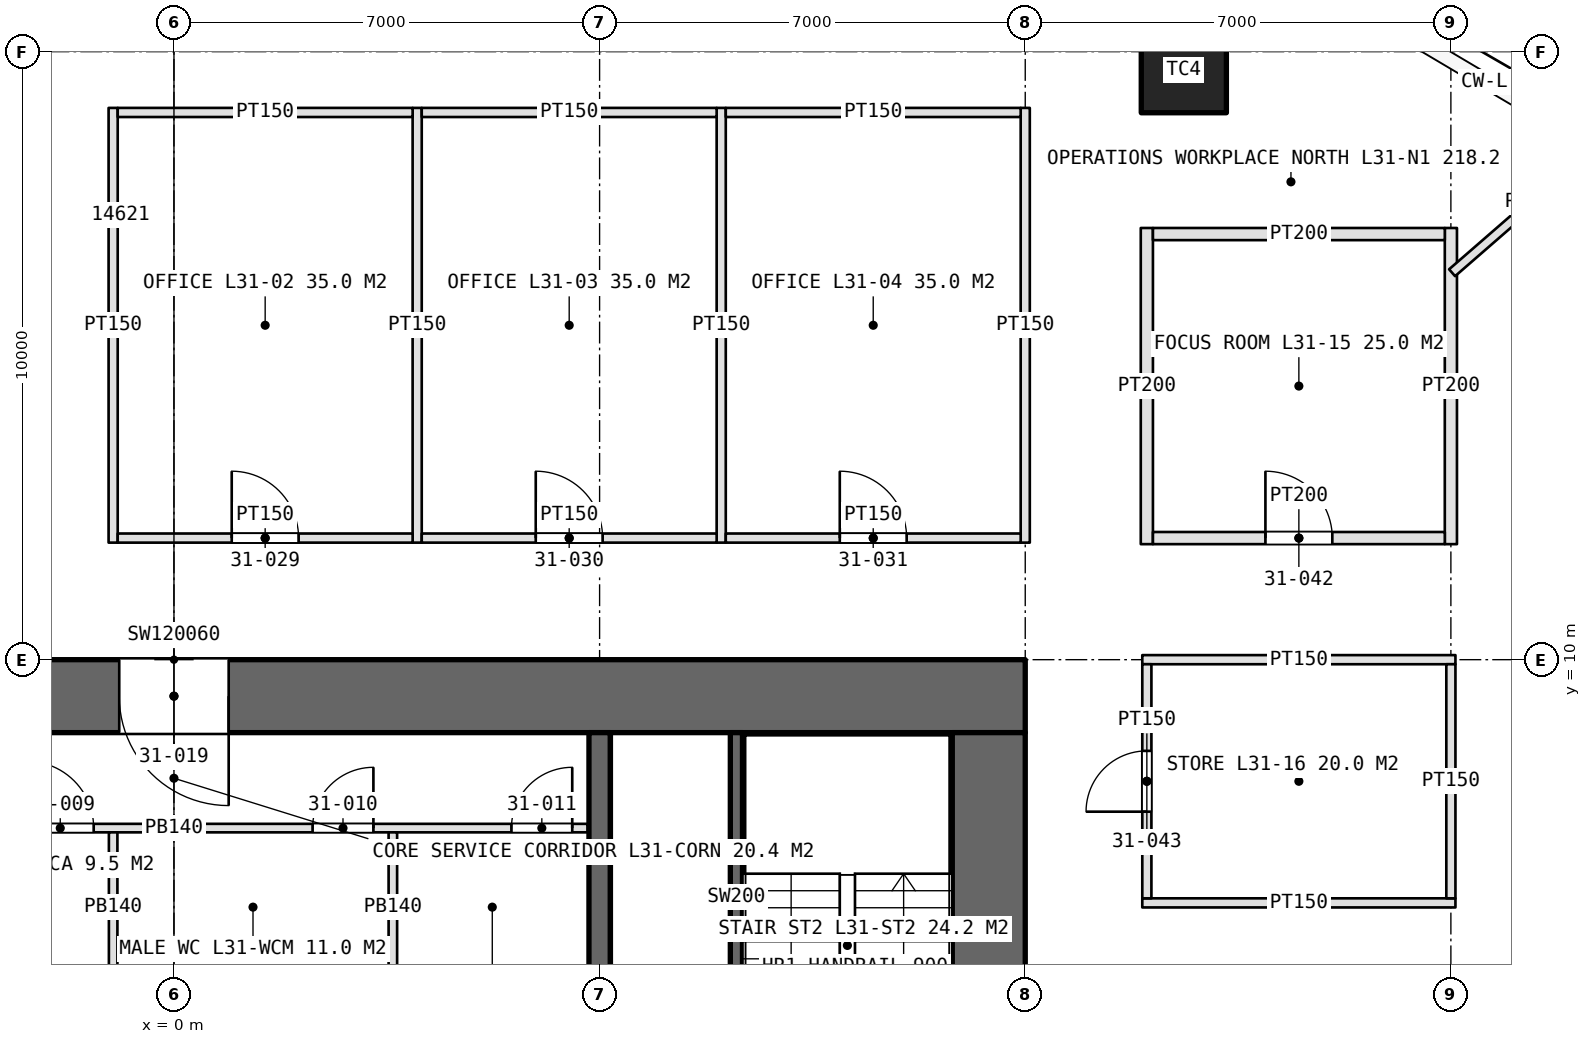
"""IFC4 building model, lengths in metres.
Left out: names, types, materials, properties, quantities, classifications, styles, units other than length and angle.
Written with IfcOpenShell. Run it as: python <this file> out.ifc"""

import sys

from ifc_helpers import new_model, si_unit, direction, frame, frame_2d, origin, origin_2d, place, context, subcontext, project, spatial, rectangle, extrude, element, fill, save


model = new_model("IFC4")
c1 = context("Model", 3, precision=1e-05, world=origin(), true_north=direction((0.0, 1.0)))
c2 = subcontext(c1, "Body", "Model", "MODEL_VIEW")
j1 = project(units=[si_unit("LENGTHUNIT", "METRE"), si_unit("PLANEANGLEUNIT", "RADIAN")], contexts=[c1])
p1 = place(None, origin())
s1 = spatial("IfcSite", under=j1, at=p1, CompositionType="ELEMENT")
p2 = place(p1, origin())
s2 = spatial("IfcBuilding", under=s1, at=p2, CompositionType="ELEMENT")
p3 = place(p2, frame((0.0, 0.0, 147.0)))
s3 = spatial("IfcBuildingStorey", under=s2, at=p3, CompositionType="ELEMENT", Elevation=147.0)
p4 = place(p3, frame((14.0, 9.4, 0.0), z_axis=(0.0, 0.0, 1.0), x_axis=(-1.0, 0.0, 0.0)))
e1 = element("IfcWall", 1, at=p4, inside=s3, PredefinedType="SHEAR", context=c2, shape_type="SweptSolid", body=[
    extrude(rectangle(XDim=28.0, YDim=1.2, at=frame_2d((14.0, 0.0))), origin(), (0.0, 0.0, 1.0), 4.2),
])
p5 = place(p4, frame((24.0, 0.0, 0.0)))
e2 = element("IfcOpeningElement", 2, at=p5, cuts=e1, PredefinedType="OPENING", context=c2, shape_type="SweptSolid", body=[
    extrude(rectangle(XDim=1.0, YDim=2.4, at=frame_2d((0.5, 1.2))), frame((0.0, 0.61, 0.0), z_axis=(0.0, -1.0, 0.0), x_axis=(1.0, 0.0, 0.0)), (0.0, 0.0, 1.0), 1.22),
])
p6 = place(p4, frame((13.1, 0.0, 0.0)))
e3 = element("IfcOpeningElement", 3, at=p6, cuts=e1, PredefinedType="OPENING", context=c2, shape_type="SweptSolid", body=[
    extrude(rectangle(XDim=1.8, YDim=2.4, at=frame_2d((0.9, 1.2))), frame((0.0, 0.61, 0.0), z_axis=(0.0, -1.0, 0.0), x_axis=(1.0, 0.0, 0.0)), (0.0, 0.0, 1.0), 1.22),
])
p7 = place(p3, frame((13.4, -8.8, 0.0), z_axis=(0.0, 0.0, 1.0), x_axis=(0.0, 1.0, 0.0)))
e4 = element("IfcWall", 4, at=p7, inside=s3, PredefinedType="SHEAR", context=c2, shape_type="SweptSolid", body=[
    extrude(rectangle(XDim=17.6, YDim=1.2, at=frame_2d((8.8, 0.0))), origin(), (0.0, 0.0, 1.0), 4.2),
])
p8 = place(p7, frame((7.9, 0.0, 0.0)))
e5 = element("IfcOpeningElement", 5, at=p8, cuts=e4, PredefinedType="OPENING", context=c2, shape_type="SweptSolid", body=[
    extrude(rectangle(XDim=1.8, YDim=2.4, at=frame_2d((0.9, 1.2))), frame((0.0, 0.61, 0.0), z_axis=(0.0, -1.0, 0.0), x_axis=(1.0, 0.0, 0.0)), (0.0, 0.0, 1.0), 1.22),
])
p9 = place(p3, frame((7.0, -8.8, 0.0), z_axis=(0.0, 0.0, 1.0), x_axis=(0.0, 1.0, 0.0)))
e6 = element("IfcWall", 6, at=p9, inside=s3, PredefinedType="SHEAR", context=c2, shape_type="SweptSolid", body=[
    extrude(rectangle(XDim=17.6, YDim=0.35, at=frame_2d((8.8, 0.0))), origin(), (0.0, 0.0, 1.0), 4.2),
])
p10 = place(p9, frame((7.9, 0.0, 0.0)))
e7 = element("IfcOpeningElement", 7, at=p10, cuts=e6, PredefinedType="OPENING", context=c2, shape_type="SweptSolid", body=[
    extrude(rectangle(XDim=1.8, YDim=2.4, at=frame_2d((0.9, 1.2))), frame((0.0, 0.185, 0.0), z_axis=(0.0, -1.0, 0.0), x_axis=(1.0, 0.0, 0.0)), (0.0, 0.0, 1.0), 0.37),
])
p11 = place(p3, frame((16.608, 19.695, 0.0), z_axis=(0.0, 0.0, 1.0), x_axis=(1.0, 0.0, 0.0)))
e8 = element("IfcColumn", 8, at=p11, inside=s3, PredefinedType="COLUMN", context=c2, shape_type="SweptSolid", body=[
    extrude(rectangle(XDim=1.4, YDim=1.4, at=origin_2d()), origin(), (0.0, 0.0, 1.0), 4.2),
])
p12 = place(p3, frame((-6.8, 7.23, 0.0), z_axis=(0.0, 0.0, 1.0), x_axis=(1.0, 0.0, 0.0)))
e9 = element("IfcWall", 9, at=p12, inside=s3, PredefinedType="PARTITIONING", context=c2, shape_type="SweptSolid", body=[
    extrude(rectangle(XDim=13.6, YDim=0.14, at=frame_2d((6.8, 0.0))), origin(), (0.0, 0.0, 1.0), 3.95),
])
p13 = place(p12, frame((0.58, 0.0, 0.0)))
e10 = element("IfcOpeningElement", 10, at=p13, cuts=e9, PredefinedType="OPENING", context=c2, shape_type="SweptSolid", body=[
    extrude(rectangle(XDim=0.9, YDim=2.4, at=frame_2d((0.45, 1.2))), frame((0.0, 0.08, 0.0), z_axis=(0.0, -1.0, 0.0), x_axis=(1.0, 0.0, 0.0)), (0.0, 0.0, 1.0), 0.16),
])
p14 = place(p12, frame((4.38, 0.0, 0.0)))
e11 = element("IfcOpeningElement", 11, at=p14, cuts=e9, PredefinedType="OPENING", context=c2, shape_type="SweptSolid", body=[
    extrude(rectangle(XDim=1.1, YDim=2.4, at=frame_2d((0.55, 1.2))), frame((0.0, 0.08, 0.0), z_axis=(0.0, -1.0, 0.0), x_axis=(1.0, 0.0, 0.0)), (0.0, 0.0, 1.0), 0.16),
])
p15 = place(p12, frame((9.08, 0.0, 0.0)))
e12 = element("IfcOpeningElement", 12, at=p15, cuts=e9, PredefinedType="OPENING", context=c2, shape_type="SweptSolid", body=[
    extrude(rectangle(XDim=1.0, YDim=2.4, at=frame_2d((0.5, 1.2))), frame((0.0, 0.08, 0.0), z_axis=(0.0, -1.0, 0.0), x_axis=(1.0, 0.0, 0.0)), (0.0, 0.0, 1.0), 0.16),
])
p16 = place(p12, frame((12.35, 0.0, 0.0)))
e13 = element("IfcOpeningElement", 13, at=p16, cuts=e9, PredefinedType="OPENING", context=c2, shape_type="SweptSolid", body=[
    extrude(rectangle(XDim=1.0, YDim=2.4, at=frame_2d((0.5, 1.2))), frame((0.0, 0.08, 0.0), z_axis=(0.0, -1.0, 0.0), x_axis=(1.0, 0.0, 0.0)), (0.0, 0.0, 1.0), 0.16),
])
for number, where, z_axis, x_axis in (
    (14, (-1.0, 4.7, 0.0), (0.0, 0.0, 1.0), (0.0, 1.0, 0.0)),
    (15, (3.6, 4.7, 0.0), (0.0, 0.0, 1.0), (0.0, 1.0, 0.0)),
):
    element("IfcWall", number, at=place(p3, frame(where, z_axis=z_axis, x_axis=x_axis)), inside=s3, PredefinedType="PARTITIONING", context=c2, shape_type="SweptSolid", body=[
        extrude(rectangle(XDim=2.46, YDim=0.14, at=frame_2d((1.23, 0.0))), origin(), (0.0, 0.0, 1.0), 3.95),
    ])
p17 = place(p3, frame((9.25, 3.4, 0.0), z_axis=(0.0, 0.0, 1.0), x_axis=(0.0, 1.0, 0.0)))
e16 = element("IfcWall", 16, at=p17, inside=s3, PredefinedType="SOLIDWALL", context=c2, shape_type="SweptSolid", body=[
    extrude(rectangle(XDim=5.4, YDim=0.2, at=frame_2d((2.7, 0.0))), origin(), (0.0, 0.0, 1.0), 4.2),
])
for number, where, z_axis, x_axis in (
    (17, (-1.0, 11.925, 0.0), (0.0, 0.0, 1.0), (0.0, 1.0, 0.0)),
    (18, (4.0, 11.925, 0.0), (0.0, 0.0, 1.0), (0.0, 1.0, 0.0)),
    (19, (9.0, 11.925, 0.0), (0.0, 0.0, 1.0), (0.0, 1.0, 0.0)),
    (20, (14.0, 11.925, 0.0), (0.0, 0.0, 1.0), (0.0, 1.0, 0.0)),
):
    element("IfcWall", number, at=place(p3, frame(where, z_axis=z_axis, x_axis=x_axis)), inside=s3, PredefinedType="PARTITIONING", context=c2, shape_type="SweptSolid", body=[
        extrude(rectangle(XDim=7.15, YDim=0.15, at=frame_2d((3.575, 0.0))), origin(), (0.0, 0.0, 1.0), 3.0),
    ])
p18 = place(p3, frame((-0.925, 12.0, 0.0), z_axis=(0.0, 0.0, 1.0), x_axis=(1.0, 0.0, 0.0)))
e21 = element("IfcWall", 21, at=p18, inside=s3, PredefinedType="PARTITIONING", context=c2, shape_type="SweptSolid", body=[
    extrude(rectangle(XDim=4.85, YDim=0.15, at=frame_2d((2.425, 0.0))), origin(), (0.0, 0.0, 1.0), 3.0),
])
p19 = place(p18, frame((1.875, 0.0, 0.0)))
e22 = element("IfcOpeningElement", 22, at=p19, cuts=e21, PredefinedType="OPENING", context=c2, shape_type="SweptSolid", body=[
    extrude(rectangle(XDim=1.1, YDim=2.3, at=frame_2d((0.55, 1.15))), frame((0.0, 0.085, 0.0), z_axis=(0.0, -1.0, 0.0), x_axis=(1.0, 0.0, 0.0)), (0.0, 0.0, 1.0), 0.17),
])
p20 = place(p3, frame((-0.925, 19.0, 0.0), z_axis=(0.0, 0.0, 1.0), x_axis=(1.0, 0.0, 0.0)))
e23 = element("IfcWall", 23, at=p20, inside=s3, PredefinedType="PARTITIONING", context=c2, shape_type="SweptSolid", body=[
    extrude(rectangle(XDim=4.85, YDim=0.15, at=frame_2d((2.425, 0.0))), origin(), (0.0, 0.0, 1.0), 3.0),
])
p21 = place(p3, frame((4.075, 12.0, 0.0), z_axis=(0.0, 0.0, 1.0), x_axis=(1.0, 0.0, 0.0)))
e24 = element("IfcWall", 24, at=p21, inside=s3, PredefinedType="PARTITIONING", context=c2, shape_type="SweptSolid", body=[
    extrude(rectangle(XDim=4.85, YDim=0.15, at=frame_2d((2.425, 0.0))), origin(), (0.0, 0.0, 1.0), 3.0),
])
p22 = place(p21, frame((1.875, 0.0, 0.0)))
e25 = element("IfcOpeningElement", 25, at=p22, cuts=e24, PredefinedType="OPENING", context=c2, shape_type="SweptSolid", body=[
    extrude(rectangle(XDim=1.1, YDim=2.3, at=frame_2d((0.55, 1.15))), frame((0.0, 0.085, 0.0), z_axis=(0.0, -1.0, 0.0), x_axis=(1.0, 0.0, 0.0)), (0.0, 0.0, 1.0), 0.17),
])
p23 = place(p3, frame((4.075, 19.0, 0.0), z_axis=(0.0, 0.0, 1.0), x_axis=(1.0, 0.0, 0.0)))
e26 = element("IfcWall", 26, at=p23, inside=s3, PredefinedType="PARTITIONING", context=c2, shape_type="SweptSolid", body=[
    extrude(rectangle(XDim=4.85, YDim=0.15, at=frame_2d((2.425, 0.0))), origin(), (0.0, 0.0, 1.0), 3.0),
])
p24 = place(p3, frame((9.075, 12.0, 0.0), z_axis=(0.0, 0.0, 1.0), x_axis=(1.0, 0.0, 0.0)))
e27 = element("IfcWall", 27, at=p24, inside=s3, PredefinedType="PARTITIONING", context=c2, shape_type="SweptSolid", body=[
    extrude(rectangle(XDim=4.85, YDim=0.15, at=frame_2d((2.425, 0.0))), origin(), (0.0, 0.0, 1.0), 3.0),
])
p25 = place(p24, frame((1.875, 0.0, 0.0)))
e28 = element("IfcOpeningElement", 28, at=p25, cuts=e27, PredefinedType="OPENING", context=c2, shape_type="SweptSolid", body=[
    extrude(rectangle(XDim=1.1, YDim=2.3, at=frame_2d((0.55, 1.15))), frame((0.0, 0.085, 0.0), z_axis=(0.0, -1.0, 0.0), x_axis=(1.0, 0.0, 0.0)), (0.0, 0.0, 1.0), 0.17),
])
p26 = place(p3, frame((9.075, 19.0, 0.0), z_axis=(0.0, 0.0, 1.0), x_axis=(1.0, 0.0, 0.0)))
e29 = element("IfcWall", 29, at=p26, inside=s3, PredefinedType="PARTITIONING", context=c2, shape_type="SweptSolid", body=[
    extrude(rectangle(XDim=4.85, YDim=0.15, at=frame_2d((2.425, 0.0))), origin(), (0.0, 0.0, 1.0), 3.0),
])
for number, where, z_axis, x_axis in (
    (30, (16.0, 11.9, 0.0), (0.0, 0.0, 1.0), (0.0, 1.0, 0.0)),
    (31, (21.0, 11.9, 0.0), (0.0, 0.0, 1.0), (0.0, 1.0, 0.0)),
):
    element("IfcWall", number, at=place(p3, frame(where, z_axis=z_axis, x_axis=x_axis)), inside=s3, PredefinedType="PARTITIONING", context=c2, shape_type="SweptSolid", body=[
        extrude(rectangle(XDim=5.2, YDim=0.2, at=frame_2d((2.6, 0.0))), origin(), (0.0, 0.0, 1.0), 3.0),
    ])
p27 = place(p3, frame((16.1, 12.0, 0.0), z_axis=(0.0, 0.0, 1.0), x_axis=(1.0, 0.0, 0.0)))
e32 = element("IfcWall", 32, at=p27, inside=s3, PredefinedType="PARTITIONING", context=c2, shape_type="SweptSolid", body=[
    extrude(rectangle(XDim=4.8, YDim=0.2, at=frame_2d((2.4, 0.0))), origin(), (0.0, 0.0, 1.0), 3.0),
])
p28 = place(p27, frame((1.85, 0.0, 0.0)))
e33 = element("IfcOpeningElement", 33, at=p28, cuts=e32, PredefinedType="OPENING", context=c2, shape_type="SweptSolid", body=[
    extrude(rectangle(XDim=1.1, YDim=2.3, at=frame_2d((0.55, 1.15))), frame((0.0, 0.11, 0.0), z_axis=(0.0, -1.0, 0.0), x_axis=(1.0, 0.0, 0.0)), (0.0, 0.0, 1.0), 0.22),
])
p29 = place(p3, frame((16.1, 17.0, 0.0), z_axis=(0.0, 0.0, 1.0), x_axis=(1.0, 0.0, 0.0)))
e34 = element("IfcWall", 34, at=p29, inside=s3, PredefinedType="PARTITIONING", context=c2, shape_type="SweptSolid", body=[
    extrude(rectangle(XDim=4.8, YDim=0.2, at=frame_2d((2.4, 0.0))), origin(), (0.0, 0.0, 1.0), 3.0),
])
for number, where, z_axis, x_axis in (
    (35, (15.925, 6.0, 0.0), (0.0, 0.0, 1.0), (1.0, 0.0, 0.0)),
    (36, (15.925, 10.0, 0.0), (0.0, 0.0, 1.0), (1.0, 0.0, 0.0)),
):
    element("IfcWall", number, at=place(p3, frame(where, z_axis=z_axis, x_axis=x_axis)), inside=s3, PredefinedType="PARTITIONING", context=c2, shape_type="SweptSolid", body=[
        extrude(rectangle(XDim=5.15, YDim=0.15, at=frame_2d((2.575, 0.0))), origin(), (0.0, 0.0, 1.0), 3.0),
    ])
p30 = place(p3, frame((16.0, 6.075, 0.0), z_axis=(0.0, 0.0, 1.0), x_axis=(0.0, 1.0, 0.0)))
e37 = element("IfcWall", 37, at=p30, inside=s3, PredefinedType="PARTITIONING", context=c2, shape_type="SweptSolid", body=[
    extrude(rectangle(XDim=3.85, YDim=0.15, at=frame_2d((1.925, 0.0))), origin(), (0.0, 0.0, 1.0), 3.0),
])
p31 = place(p30, frame((1.425, 0.0, 0.0)))
e38 = element("IfcOpeningElement", 38, at=p31, cuts=e37, PredefinedType="OPENING", context=c2, shape_type="SweptSolid", body=[
    extrude(rectangle(XDim=1.0, YDim=2.2, at=frame_2d((0.5, 1.1))), frame((0.0, 0.085, 0.0), z_axis=(0.0, -1.0, 0.0), x_axis=(1.0, 0.0, 0.0)), (0.0, 0.0, 1.0), 0.17),
])
p32 = place(p3, frame((21.0, 6.075, 0.0), z_axis=(0.0, 0.0, 1.0), x_axis=(0.0, 1.0, 0.0)))
e39 = element("IfcWall", 39, at=p32, inside=s3, PredefinedType="PARTITIONING", context=c2, shape_type="SweptSolid", body=[
    extrude(rectangle(XDim=3.85, YDim=0.15, at=frame_2d((1.925, 0.0))), origin(), (0.0, 0.0, 1.0), 3.0),
])
p33 = place(p3, frame((21.02, 16.364, 0.0), z_axis=(0.0, 0.0, 1.0), x_axis=(0.75467183248, 0.656102450278, 0.0)))
e40 = element("IfcWall", 40, at=p33, inside=s3, PredefinedType="PARTITIONING", context=c2, shape_type="SweptSolid", body=[
    extrude(rectangle(XDim=3.567, YDim=0.15, at=frame_2d((1.783, 0.0))), origin(), (0.0, 0.0, 1.0), 3.0),
])
p34 = place(p14, origin())
e41 = element("IfcDoor", 41, at=p34, inside=s3, OperationType="SINGLE_SWING_LEFT", PredefinedType="DOOR", context=c2, shape_type="SweptSolid", body=[
    extrude(rectangle(XDim=1.1, YDim=2.4, at=frame_2d((0.55, 1.2))), frame((0.0, 0.025, 0.0), z_axis=(0.0, -1.0, 0.0), x_axis=(1.0, 0.0, 0.0)), (0.0, 0.0, 1.0), 0.05),
])
fill(e11, e41)
p35 = place(p15, origin())
e42 = element("IfcDoor", 42, at=p35, inside=s3, OperationType="SINGLE_SWING_RIGHT", PredefinedType="DOOR", context=c2, shape_type="SweptSolid", body=[
    extrude(rectangle(XDim=1.0, YDim=2.4, at=frame_2d((0.5, 1.2))), frame((0.0, 0.025, 0.0), z_axis=(0.0, -1.0, 0.0), x_axis=(1.0, 0.0, 0.0)), (0.0, 0.0, 1.0), 0.05),
])
fill(e12, e42)
p36 = place(p16, origin())
e43 = element("IfcDoor", 43, at=p36, inside=s3, OperationType="SINGLE_SWING_RIGHT", PredefinedType="DOOR", context=c2, shape_type="SweptSolid", body=[
    extrude(rectangle(XDim=1.0, YDim=2.4, at=frame_2d((0.5, 1.2))), frame((0.0, 0.025, 0.0), z_axis=(0.0, -1.0, 0.0), x_axis=(1.0, 0.0, 0.0)), (0.0, 0.0, 1.0), 0.05),
])
fill(e13, e43)
p37 = place(p6, origin())
e44 = element("IfcDoor", 44, at=p37, inside=s3, OperationType="DOUBLE_DOOR_SINGLE_SWING", PredefinedType="DOOR", context=c2, shape_type="SweptSolid", body=[
    extrude(rectangle(XDim=1.8, YDim=2.4, at=frame_2d((0.9, 1.2))), frame((0.0, 0.025, 0.0), z_axis=(0.0, -1.0, 0.0), x_axis=(1.0, 0.0, 0.0)), (0.0, 0.0, 1.0), 0.05),
])
fill(e3, e44)
p38 = place(p19, origin())
e45 = element("IfcDoor", 45, at=p38, inside=s3, OperationType="SINGLE_SWING_LEFT", PredefinedType="DOOR", context=c2, shape_type="SweptSolid", body=[
    extrude(rectangle(XDim=1.1, YDim=2.3, at=frame_2d((0.55, 1.15))), frame((0.0, 0.025, 0.0), z_axis=(0.0, -1.0, 0.0), x_axis=(1.0, 0.0, 0.0)), (0.0, 0.0, 1.0), 0.05),
])
fill(e22, e45)
p39 = place(p22, origin())
e46 = element("IfcDoor", 46, at=p39, inside=s3, OperationType="SINGLE_SWING_LEFT", PredefinedType="DOOR", context=c2, shape_type="SweptSolid", body=[
    extrude(rectangle(XDim=1.1, YDim=2.3, at=frame_2d((0.55, 1.15))), frame((0.0, 0.025, 0.0), z_axis=(0.0, -1.0, 0.0), x_axis=(1.0, 0.0, 0.0)), (0.0, 0.0, 1.0), 0.05),
])
fill(e25, e46)
p40 = place(p25, origin())
e47 = element("IfcDoor", 47, at=p40, inside=s3, OperationType="SINGLE_SWING_LEFT", PredefinedType="DOOR", context=c2, shape_type="SweptSolid", body=[
    extrude(rectangle(XDim=1.1, YDim=2.3, at=frame_2d((0.55, 1.15))), frame((0.0, 0.025, 0.0), z_axis=(0.0, -1.0, 0.0), x_axis=(1.0, 0.0, 0.0)), (0.0, 0.0, 1.0), 0.05),
])
fill(e28, e47)
p41 = place(p28, origin())
e48 = element("IfcDoor", 48, at=p41, inside=s3, OperationType="SINGLE_SWING_LEFT", PredefinedType="DOOR", context=c2, shape_type="SweptSolid", body=[
    extrude(rectangle(XDim=1.1, YDim=2.3, at=frame_2d((0.55, 1.15))), frame((0.0, 0.025, 0.0), z_axis=(0.0, -1.0, 0.0), x_axis=(1.0, 0.0, 0.0)), (0.0, 0.0, 1.0), 0.05),
])
fill(e33, e48)
p42 = place(p31, origin())
e49 = element("IfcDoor", 49, at=p42, inside=s3, OperationType="SINGLE_SWING_LEFT", PredefinedType="DOOR", context=c2, shape_type="SweptSolid", body=[
    extrude(rectangle(XDim=1.0, YDim=2.2, at=frame_2d((0.5, 1.1))), frame((0.0, 0.025, 0.0), z_axis=(0.0, -1.0, 0.0), x_axis=(1.0, 0.0, 0.0)), (0.0, 0.0, 1.0), 0.05),
])
fill(e38, e49)
save(model, sys.argv[1])
